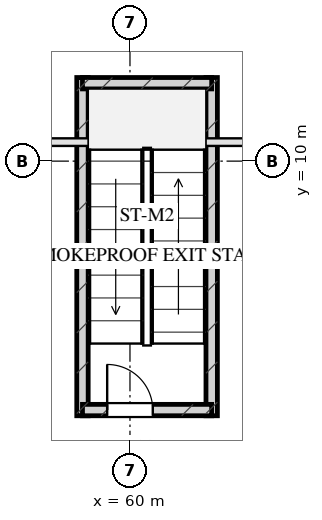
"""IFC4 building model, lengths in metres.
Left out: names, types, materials, properties, quantities, classifications, styles, units other than length and angle.
Written with IfcOpenShell. Run it as: python <this file> out.ifc"""

import sys

from ifc_helpers import new_model, si_unit, direction, frame, frame_2d, origin, place, context, subcontext, project, spatial, rectangle, extrude, element, fill, save


model = new_model("IFC4")
c1 = context("Model", 3, precision=1e-05, world=origin(), true_north=direction((0.0, 1.0)))
c2 = subcontext(c1, "Body", "Model", "MODEL_VIEW")
j1 = project(units=[si_unit("LENGTHUNIT", "METRE"), si_unit("PLANEANGLEUNIT", "RADIAN")], contexts=[c1])
p1 = place(None, origin())
s1 = spatial("IfcSite", under=j1, at=p1, CompositionType="ELEMENT")
p2 = place(p1, origin())
s2 = spatial("IfcBuilding", under=s1, at=p2, CompositionType="ELEMENT")
p3 = place(p2, frame((0.0, 0.0, -12.0)))
s3 = spatial("IfcBuildingStorey", under=s2, at=p3, CompositionType="ELEMENT", Elevation=-12.0)
for number, where, z_axis, x_axis in (
    (1, (58.75, 3.3, 0.0), (0.0, 0.0, 1.0), (0.0, 1.0, 0.0)),
    (2, (62.15, 3.3, 0.0), (0.0, 0.0, 1.0), (0.0, 1.0, 0.0)),
):
    element("IfcWall", number, at=place(p3, frame(where, z_axis=z_axis, x_axis=x_axis)), inside=s3, PredefinedType="SHEAR", context=c2, shape_type="SweptSolid", body=[
        extrude(rectangle(XDim=8.9, YDim=0.3, at=frame_2d((4.45, 0.0))), origin(), (0.0, 0.0, 1.0), 6.0),
    ])
p4 = place(p3, frame((58.75, 12.05, 0.0), z_axis=(0.0, 0.0, 1.0), x_axis=(1.0, 0.0, 0.0)))
e3 = element("IfcWall", 3, at=p4, inside=s3, PredefinedType="SHEAR", context=c2, shape_type="SweptSolid", body=[
    extrude(rectangle(XDim=3.4, YDim=0.3, at=frame_2d((1.7, 0.0))), origin(), (0.0, 0.0, 1.0), 6.0),
])
p5 = place(p3, frame((58.75, 3.45, 0.0), z_axis=(0.0, 0.0, 1.0), x_axis=(1.0, 0.0, 0.0)))
e4 = element("IfcWall", 4, at=p5, inside=s3, PredefinedType="SHEAR", context=c2, shape_type="SweptSolid", body=[
    extrude(rectangle(XDim=3.4, YDim=0.3, at=frame_2d((1.7, 0.0))), origin(), (0.0, 0.0, 1.0), 6.0),
])
p6 = place(p5, frame((0.65, 0.0, 0.0)))
e5 = element("IfcOpeningElement", 5, at=p6, cuts=e4, PredefinedType="OPENING", context=c2, shape_type="SweptSolid", body=[
    extrude(rectangle(XDim=1.2, YDim=2.05, at=frame_2d((0.6, 1.025))), frame((0.0, 0.16, 0.0), z_axis=(0.0, -1.0, 0.0), x_axis=(1.0, 0.0, 0.0)), (0.0, 0.0, 1.0), 0.32),
])
p7 = place(p3, frame((0.65, 10.5, 0.0), z_axis=(0.0, 0.0, 1.0), x_axis=(1.0, 0.0, 0.0)))
e6 = element("IfcWall", 6, at=p7, inside=s3, PredefinedType="PARTITIONING", context=c2, shape_type="SweptSolid", body=[
    extrude(rectangle(XDim=118.7, YDim=0.2, at=frame_2d((59.35, 0.0))), origin(), (0.0, 0.0, 1.0), 5.635),
])
p8 = place(p7, frame((18.0, 0.0, 0.0)))
e7 = element("IfcOpeningElement", 7, at=p8, cuts=e6, PredefinedType="OPENING", context=c2, shape_type="SweptSolid", body=[
    extrude(rectangle(XDim=1.5, YDim=2.05, at=frame_2d((0.75, 1.025))), frame((0.0, 0.11, 0.0), z_axis=(0.0, -1.0, 0.0), x_axis=(1.0, 0.0, 0.0)), (0.0, 0.0, 1.0), 0.22),
])
p9 = place(p6, origin())
e8 = element("IfcDoor", 8, at=p9, inside=s3, OperationType="SINGLE_SWING_LEFT", PredefinedType="DOOR", context=c2, shape_type="SweptSolid", body=[
    extrude(rectangle(XDim=1.2, YDim=2.05, at=frame_2d((0.6, 1.025))), frame((0.0, 0.025, 0.0), z_axis=(0.0, -1.0, 0.0), x_axis=(1.0, 0.0, 0.0)), (0.0, 0.0, 1.0), 0.05),
])
fill(e5, e8)
save(model, sys.argv[1])
